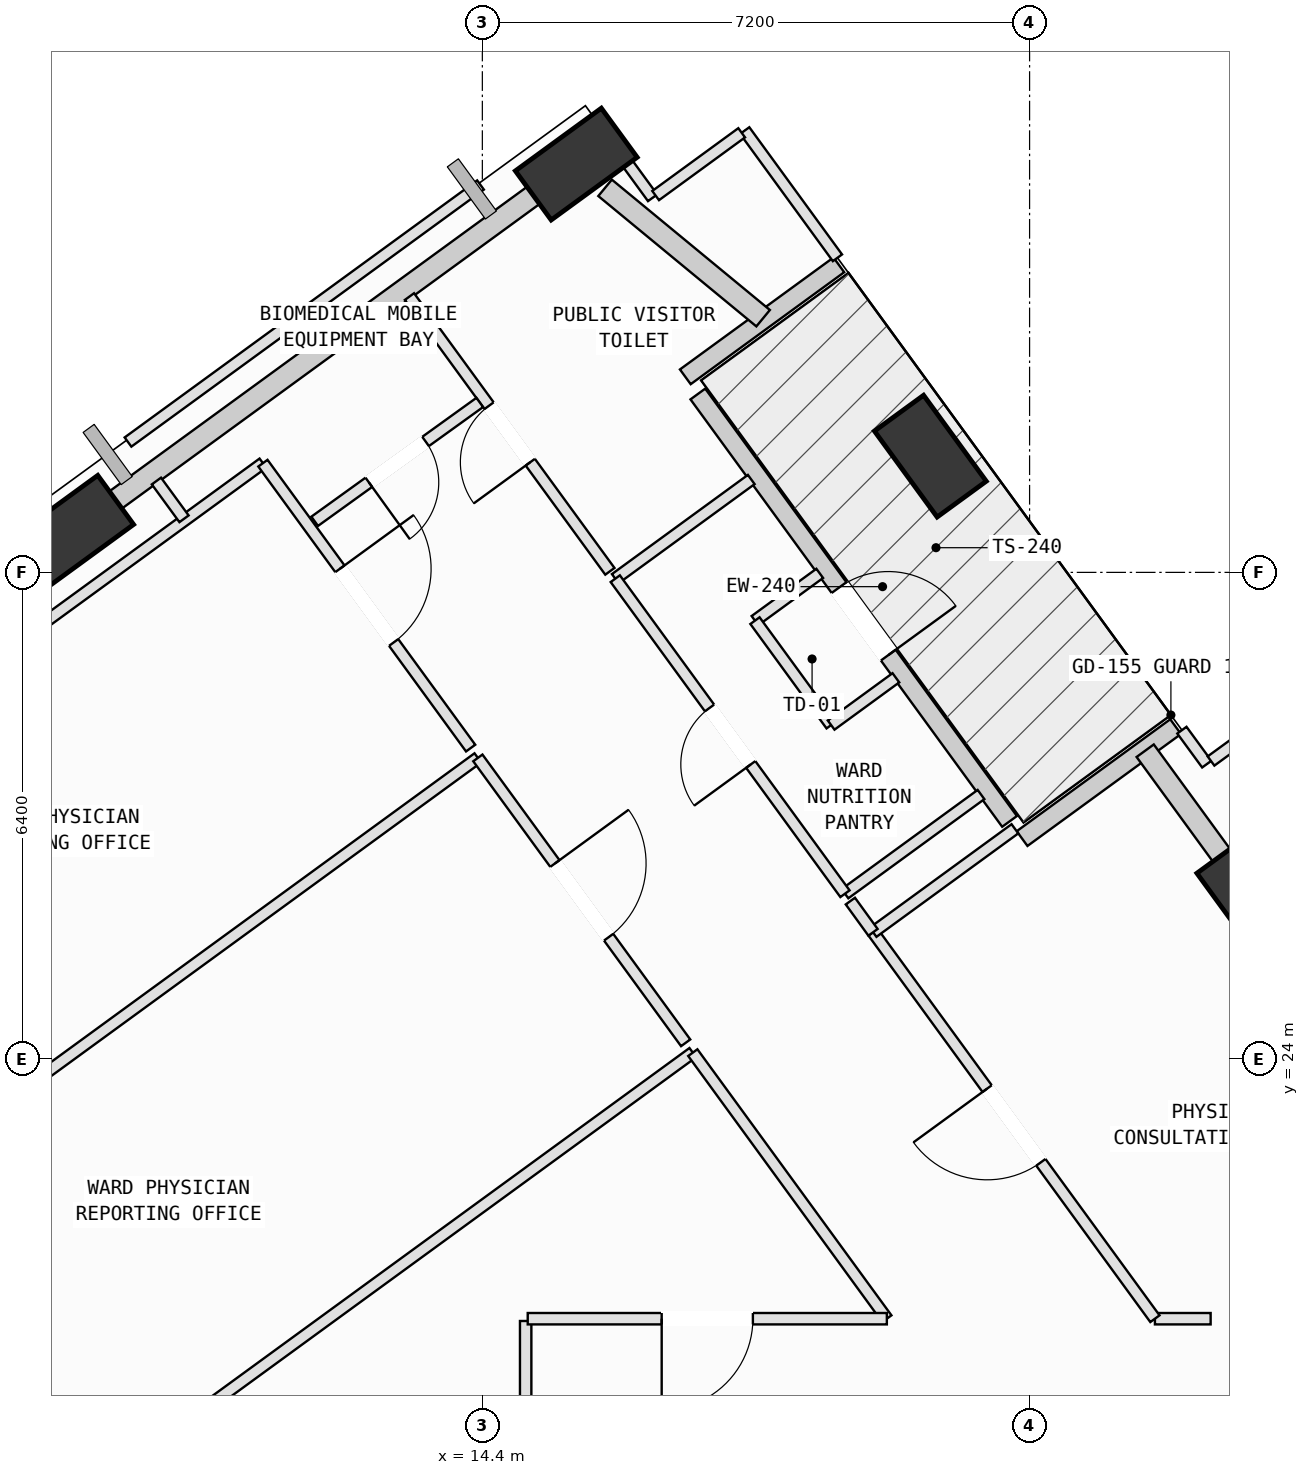
"""IFC4 building model, lengths in metres.
Left out: names, types, materials, properties, quantities, classifications, styles, units other than length and angle.
Written with IfcOpenShell. Run it as: python <this file> out.ifc"""

import sys

from ifc_helpers import new_model, si_unit, direction, frame, frame_2d, origin, origin_2d, place, context, subcontext, project, spatial, rectangle, extrude, element, fill, save


model = new_model("IFC4")
c1 = context("Model", 3, precision=1e-05, world=origin(), true_north=direction((0.0, 1.0)))
c2 = subcontext(c1, "Body", "Model", "MODEL_VIEW")
j1 = project(units=[si_unit("LENGTHUNIT", "METRE"), si_unit("PLANEANGLEUNIT", "RADIAN")], contexts=[c1])
p1 = place(None, origin())
s1 = spatial("IfcSite", under=j1, at=p1, CompositionType="ELEMENT")
p2 = place(p1, origin())
s2 = spatial("IfcBuilding", under=s1, at=p2, CompositionType="ELEMENT")
p3 = place(p2, frame((0.0, 0.0, 177.8)))
s3 = spatial("IfcBuildingStorey", under=s2, at=p3, CompositionType="ELEMENT", Elevation=177.8)
p4 = place(p3, frame((24.537, 26.112, 0.002), z_axis=(-0.005127954064, -0.037604996467, 0.999279524622), x_axis=(-0.474702077533, 0.879612161779, 0.030665655638)))
e1 = element("IfcColumn", 1, at=p4, inside=s3, PredefinedType="COLUMN", context=c2, shape_type="SweptSolid", body=[
    extrude(rectangle(XDim=1.4, YDim=0.8, at=origin_2d()), origin(), (0.0, 0.0, 1.0), 3.999),
])
p5 = place(p3, frame((20.294, 31.929, 0.002), z_axis=(-0.029022589013, -0.055301445872, 0.998047814191), x_axis=(-0.146974765594, 0.987852188566, 0.050462578447)))
e2 = element("IfcColumn", 2, at=p5, inside=s3, PredefinedType="COLUMN", context=c2, shape_type="SweptSolid", body=[
    extrude(rectangle(XDim=1.4, YDim=0.8, at=origin_2d()), origin(), (0.0, 0.0, 1.0), 4.004),
])
p6 = place(p3, frame((15.636, 35.772, 0.002), z_axis=(-0.044671178967, -0.074553398139, 0.99621597889), x_axis=(0.994784763155, 0.088209875762, 0.051208327568)))
e3 = element("IfcColumn", 3, at=p6, inside=s3, PredefinedType="COLUMN", context=c2, shape_type="SweptSolid", body=[
    extrude(rectangle(XDim=1.4, YDim=0.8, at=origin_2d()), origin(), (0.0, 0.0, 1.0), 4.011),
])
p7 = place(p3, frame((9.01, 30.941, 0.002), z_axis=(-0.024485078273, -0.101524977159, 0.994531628434), x_axis=(0.922851813441, 0.380208094737, 0.061533203441)))
e4 = element("IfcColumn", 4, at=p7, inside=s3, PredefinedType="COLUMN", context=c2, shape_type="SweptSolid", body=[
    extrude(rectangle(XDim=1.4, YDim=0.8, at=origin_2d()), origin(), (0.0, 0.0, 1.0), 4.018),
])
p8 = place(p3, frame((17.236, 32.747, 0.0), z_axis=(0.0, 0.0, 1.0), x_axis=(0.589164046523, -0.808013444371, 0.0)))
e5 = element("IfcWall", 5, at=p8, inside=s3, PredefinedType="SOLIDWALL", context=c2, shape_type="SweptSolid", body=[
    extrude(rectangle(XDim=6.96, YDim=0.24, at=frame_2d((3.48, 0.0))), origin(), (0.0, 0.0, 1.0), 3.265),
])
p9 = place(p8, frame((3.152, 0.0, 0.0)))
e6 = element("IfcOpeningElement", 6, at=p9, cuts=e5, PredefinedType="OPENING", context=c2, shape_type="SweptSolid", body=[
    extrude(rectangle(XDim=1.1, YDim=2.15, at=frame_2d((0.55, 1.075))), frame((0.0, 0.13, 0.0), z_axis=(0.0, -1.0, 0.0), x_axis=(1.0, 0.0, 0.0)), (0.0, 0.0, 1.0), 0.26),
])
p10 = place(p3, frame((21.501, 26.897, 0.0), z_axis=(0.0, 0.0, 1.0), x_axis=(0.808013341442, 0.589164187686, 0.0)))
e7 = element("IfcWall", 7, at=p10, inside=s3, PredefinedType="SOLIDWALL", context=c2, shape_type="SweptSolid", body=[
    extrude(rectangle(XDim=2.5, YDim=0.24, at=frame_2d((1.25, 0.0))), origin(), (0.0, 0.0, 1.0), 3.265),
])
p11 = place(p3, frame((19.091, 34.446, 0.0), z_axis=(0.0, 0.0, 1.0), x_axis=(-0.807966851779, -0.589227940976, 0.0)))
e8 = element("IfcWall", 8, at=p11, inside=s3, PredefinedType="SOLIDWALL", context=c2, shape_type="SweptSolid", body=[
    extrude(rectangle(XDim=2.5, YDim=0.24, at=frame_2d((1.25, 0.0))), origin(), (0.0, 0.0, 1.0), 3.265),
])
p12 = place(p3, frame((24.278, 26.466, 0.0), z_axis=(0.0, 0.0, 1.0), x_axis=(-0.589146798516, 0.808026020496, 0.0)))
e9 = element("IfcWall", 9, at=p12, inside=s3, PredefinedType="SOLIDWALL", context=c2, shape_type="SweptSolid", body=[
    extrude(rectangle(XDim=1.964, YDim=0.28, at=frame_2d((0.982, 0.0))), origin(), (0.0, 0.0, 1.0), 3.245),
])
p13 = place(p3, frame((16.015, 35.46, 0.0), z_axis=(0.0, 0.0, 1.0), x_axis=(0.771396619777, -0.63635466133, 0.0)))
e10 = element("IfcWall", 10, at=p13, inside=s3, PredefinedType="SOLIDWALL", context=c2, shape_type="SweptSolid", body=[
    extrude(rectangle(XDim=2.696, YDim=0.28, at=frame_2d((1.348, 0.0))), origin(), (0.0, 0.0, 1.0), 3.245),
])
p14 = place(p3, frame((9.267, 31.128, 0.0), z_axis=(0.0, 0.0, 1.0), x_axis=(0.807974712065, 0.589217162567, 0.0)))
e11 = element("IfcWall", 11, at=p14, inside=s3, PredefinedType="SOLIDWALL", context=c2, shape_type="SweptSolid", body=[
    extrude(rectangle(XDim=7.231, YDim=0.28, at=frame_2d((3.615, 0.0))), origin(), (0.0, 0.0, 1.0), 3.265),
])
p15 = place(p3, frame((14.97, 20.55, 0.0), z_axis=(0.0, 0.0, 1.0), x_axis=(0.0, -1.0, 0.0)))
e12 = element("IfcWall", 12, at=p15, inside=s3, PredefinedType="PARTITIONING", context=c2, shape_type="SweptSolid", body=[
    extrude(rectangle(XDim=2.32, YDim=0.15, at=frame_2d((1.16, 0.0))), origin(), (0.0, 0.0, 1.0), 3.78),
])
p16 = place(p3, frame((6.152, 16.047, 0.0), z_axis=(0.0, 0.0, 1.0), x_axis=(0.807978938545, 0.589211366886, 0.0)))
e13 = element("IfcWall", 13, at=p16, inside=s3, PredefinedType="PARTITIONING", context=c2, shape_type="SweptSolid", body=[
    extrude(rectangle(XDim=13.635, YDim=0.15, at=frame_2d((6.817, 0.0))), origin(), (0.0, 0.0, 1.0), 3.78),
])
p17 = place(p3, frame((17.169, 24.081, 0.0), z_axis=(0.0, 0.0, 1.0), x_axis=(0.589199746841, -0.807987412231, 0.0)))
e14 = element("IfcWall", 14, at=p17, inside=s3, PredefinedType="PARTITIONING", context=c2, shape_type="SweptSolid", body=[
    extrude(rectangle(XDim=4.333, YDim=0.15, at=frame_2d((2.167, 0.0))), origin(), (0.0, 0.0, 1.0), 3.78),
])
p18 = place(p3, frame((19.722, 20.58, 0.0), z_axis=(0.0, 0.0, 1.0), x_axis=(-1.0, 0.0, 0.0)))
e15 = element("IfcWall", 15, at=p18, inside=s3, PredefinedType="PARTITIONING", context=c2, shape_type="SweptSolid", body=[
    extrude(rectangle(XDim=4.725, YDim=0.15, at=frame_2d((2.362, 0.0))), origin(), (0.0, 0.0, 1.0), 3.78),
])
p19 = place(p18, frame((1.762, 0.0, 0.0)))
e16 = element("IfcOpeningElement", 16, at=p19, cuts=e15, PredefinedType="OPENING", context=c2, shape_type="SweptSolid", body=[
    extrude(rectangle(XDim=1.2, YDim=2.15, at=frame_2d((0.6, 1.075))), frame((0.0, 0.085, 0.0), z_axis=(0.0, -1.0, 0.0), x_axis=(1.0, 0.0, 0.0)), (0.0, 0.0, 1.0), 0.17),
])
p20 = place(p3, frame((3.324, 19.925, 0.0), z_axis=(0.0, 0.0, 1.0), x_axis=(0.807985154612, 0.589202842769, 0.0)))
e17 = element("IfcWall", 17, at=p20, inside=s3, PredefinedType="PARTITIONING", context=c2, shape_type="SweptSolid", body=[
    extrude(rectangle(XDim=13.635, YDim=0.15, at=frame_2d((6.818, 0.0))), origin(), (0.0, 0.0, 1.0), 3.78),
])
p21 = place(p3, frame((14.341, 27.959, 0.0), z_axis=(0.0, 0.0, 1.0), x_axis=(0.589203646607, -0.807984568432, 0.0)))
e18 = element("IfcWall", 18, at=p21, inside=s3, PredefinedType="PARTITIONING", context=c2, shape_type="SweptSolid", body=[
    extrude(rectangle(XDim=4.64, YDim=0.15, at=frame_2d((2.32, 0.0))), origin(), (0.0, 0.0, 1.0), 3.78),
])
p22 = place(p21, frame((1.72, 0.0, 0.0)))
e19 = element("IfcOpeningElement", 19, at=p22, cuts=e18, PredefinedType="OPENING", context=c2, shape_type="SweptSolid", body=[
    extrude(rectangle(XDim=1.2, YDim=2.15, at=frame_2d((0.6, 1.075))), frame((0.0, 0.085, 0.0), z_axis=(0.0, -1.0, 0.0), x_axis=(1.0, 0.0, 0.0)), (0.0, 0.0, 1.0), 0.17),
])
p23 = place(p3, frame((2.513, 25.275, 0.0), z_axis=(0.0, 0.0, 1.0), x_axis=(0.808028399197, 0.589143536068, 0.0)))
e20 = element("IfcWall", 20, at=p23, inside=s3, PredefinedType="PARTITIONING", context=c2, shape_type="SweptSolid", body=[
    extrude(rectangle(XDim=11.138, YDim=0.15, at=frame_2d((5.569, 0.0))), origin(), (0.0, 0.0, 1.0), 3.265),
])
p24 = place(p3, frame((11.513, 31.837, 0.0), z_axis=(0.0, 0.0, 1.0), x_axis=(0.589100581197, -0.808059716378, 0.0)))
e21 = element("IfcWall", 21, at=p24, inside=s3, PredefinedType="PARTITIONING", context=c2, shape_type="SweptSolid", body=[
    extrude(rectangle(XDim=4.64, YDim=0.15, at=frame_2d((2.32, 0.0))), origin(), (0.0, 0.0, 1.0), 3.78),
])
p25 = place(p24, frame((1.72, 0.0, 0.0)))
e22 = element("IfcOpeningElement", 22, at=p25, cuts=e21, PredefinedType="OPENING", context=c2, shape_type="SweptSolid", body=[
    extrude(rectangle(XDim=1.2, YDim=2.15, at=frame_2d((0.6, 1.075))), frame((0.0, 0.085, 0.0), z_axis=(0.0, -1.0, 0.0), x_axis=(1.0, 0.0, 0.0)), (0.0, 0.0, 1.0), 0.17),
])
p26 = place(p3, frame((23.982, 20.58, 0.0), z_axis=(0.0, 0.0, 1.0), x_axis=(-1.0, 0.0, 0.0)))
e23 = element("IfcWall", 23, at=p26, inside=s3, PredefinedType="PARTITIONING", context=c2, shape_type="SweptSolid", body=[
    extrude(rectangle(XDim=0.733, YDim=0.15, at=frame_2d((0.366, 0.0))), origin(), (0.0, 0.0, 1.0), 3.78),
])
p27 = place(p3, frame((23.249, 20.58, 0.0), z_axis=(0.0, 0.0, 1.0), x_axis=(-0.589195373933, 0.807990601019, 0.0)))
e24 = element("IfcWall", 24, at=p27, inside=s3, PredefinedType="PARTITIONING", context=c2, shape_type="SweptSolid", body=[
    extrude(rectangle(XDim=6.293, YDim=0.15, at=frame_2d((3.147, 0.0))), origin(), (0.0, 0.0, 1.0), 3.78),
])
p28 = place(p27, frame((2.547, 0.0, 0.0)))
e25 = element("IfcOpeningElement", 25, at=p28, cuts=e24, PredefinedType="OPENING", context=c2, shape_type="SweptSolid", body=[
    extrude(rectangle(XDim=1.2, YDim=2.15, at=frame_2d((0.6, 1.075))), frame((0.0, 0.085, 0.0), z_axis=(0.0, -1.0, 0.0), x_axis=(1.0, 0.0, 0.0)), (0.0, 0.0, 1.0), 0.17),
])
p29 = place(p3, frame((19.541, 25.665, 0.0), z_axis=(0.0, 0.0, 1.0), x_axis=(0.807958250953, 0.589239734503, 0.0)))
e26 = element("IfcWall", 26, at=p29, inside=s3, PredefinedType="PARTITIONING", context=c2, shape_type="SweptSolid", body=[
    extrude(rectangle(XDim=2.31, YDim=0.15, at=frame_2d((1.155, 0.0))), origin(), (0.0, 0.0, 1.0), 3.78),
])
p30 = place(p3, frame((23.604, 28.324, 0.0), z_axis=(0.0, 0.0, 1.0), x_axis=(0.590292880672, -0.807189144518, 0.0)))
e27 = element("IfcWall", 27, at=p30, inside=s3, PredefinedType="PARTITIONING", context=c2, shape_type="SweptSolid", body=[
    extrude(rectangle(XDim=0.554, YDim=0.15, at=frame_2d((0.277, 0.0))), origin(), (0.0, 0.0, 1.0), 3.78),
])
p31 = place(p3, frame((16.149, 30.317, 0.0), z_axis=(0.0, 0.0, 1.0), x_axis=(0.807867554791, 0.589364075861, 0.0)))
e28 = element("IfcWall", 28, at=p31, inside=s3, PredefinedType="PARTITIONING", context=c2, shape_type="SweptSolid", body=[
    extrude(rectangle(XDim=2.215, YDim=0.15, at=frame_2d((1.107, 0.0))), origin(), (0.0, 0.0, 1.0), 3.78),
])
p32 = place(p3, frame((18.839, 30.387, 0.0), z_axis=(0.0, 0.0, 1.0), x_axis=(-0.807653927486, -0.589656792903, 0.0)))
e29 = element("IfcWall", 29, at=p32, inside=s3, PredefinedType="PARTITIONING", context=c2, shape_type="SweptSolid", body=[
    extrude(rectangle(XDim=1.055, YDim=0.15, at=frame_2d((0.527, 0.0))), origin(), (0.0, 0.0, 1.0), 3.78),
])
p33 = place(p3, frame((17.987, 29.765, 0.0), z_axis=(0.0, 0.0, 1.0), x_axis=(0.589263942503, -0.807940595629, 0.0)))
e30 = element("IfcWall", 30, at=p33, inside=s3, PredefinedType="PARTITIONING", context=c2, shape_type="SweptSolid", body=[
    extrude(rectangle(XDim=1.7, YDim=0.15, at=frame_2d((0.85, 0.0))), origin(), (0.0, 0.0, 1.0), 3.78),
])
p34 = place(p3, frame((18.989, 28.391, 0.0), z_axis=(0.0, 0.0, 1.0), x_axis=(0.807764139301, 0.589505805959, 0.0)))
e31 = element("IfcWall", 31, at=p34, inside=s3, PredefinedType="PARTITIONING", context=c2, shape_type="SweptSolid", body=[
    extrude(rectangle(XDim=1.055, YDim=0.15, at=frame_2d((0.527, 0.0))), origin(), (0.0, 0.0, 1.0), 3.78),
])
p35 = place(p3, frame((20.961, 27.477, 0.0), z_axis=(0.0, 0.0, 1.0), x_axis=(-0.808073108898, -0.589082210456, 0.0)))
e32 = element("IfcWall", 32, at=p35, inside=s3, PredefinedType="PARTITIONING", context=c2, shape_type="SweptSolid", body=[
    extrude(rectangle(XDim=2.215, YDim=0.15, at=frame_2d((1.107, 0.0))), origin(), (0.0, 0.0, 1.0), 3.78),
])
p36 = place(p3, frame((19.171, 26.172, 0.0), z_axis=(0.0, 0.0, 1.0), x_axis=(-0.589139140752, 0.808031603858, 0.0)))
e33 = element("IfcWall", 33, at=p36, inside=s3, PredefinedType="PARTITIONING", context=c2, shape_type="SweptSolid", body=[
    extrude(rectangle(XDim=5.129, YDim=0.15, at=frame_2d((2.565, 0.0))), origin(), (0.0, 0.0, 1.0), 3.78),
])
p37 = place(p36, frame((2.105, 0.0, 0.0)))
e34 = element("IfcOpeningElement", 34, at=p37, cuts=e33, PredefinedType="OPENING", context=c2, shape_type="SweptSolid", body=[
    extrude(rectangle(XDim=0.92, YDim=2.1, at=frame_2d((0.46, 1.05))), frame((0.0, 0.085, 0.0), z_axis=(0.0, -1.0, 0.0), x_axis=(1.0, 0.0, 0.0)), (0.0, 0.0, 1.0), 0.17),
])
p38 = place(p3, frame((17.852, 36.213, 0.0), z_axis=(0.0, 0.0, 1.0), x_axis=(0.589005407572, -0.808129092318, 0.0)))
e35 = element("IfcWall", 35, at=p38, inside=s3, PredefinedType="PARTITIONING", context=c2, shape_type="SweptSolid", body=[
    extrude(rectangle(XDim=2.071, YDim=0.15, at=frame_2d((1.036, 0.0))), origin(), (0.0, 0.0, 1.0), 3.78),
])
p39 = place(p3, frame((16.078, 30.414, 0.0), z_axis=(0.0, 0.0, 1.0), x_axis=(-0.589322799206, 0.807897665757, 0.0)))
e36 = element("IfcWall", 36, at=p39, inside=s3, PredefinedType="PARTITIONING", context=c2, shape_type="SweptSolid", body=[
    extrude(rectangle(XDim=4.475, YDim=0.15, at=frame_2d((2.237, 0.0))), origin(), (0.0, 0.0, 1.0), 3.78),
])
p40 = place(p39, frame((1.777, 0.0, 0.0)))
e37 = element("IfcOpeningElement", 37, at=p40, cuts=e36, PredefinedType="OPENING", context=c2, shape_type="SweptSolid", body=[
    extrude(rectangle(XDim=0.92, YDim=2.1, at=frame_2d((0.46, 1.05))), frame((0.0, 0.085, 0.0), z_axis=(0.0, -1.0, 0.0), x_axis=(1.0, 0.0, 0.0)), (0.0, 0.0, 1.0), 0.17),
])
p41 = place(p3, frame((14.997, 35.542, 0.0), z_axis=(0.0, 0.0, 1.0), x_axis=(0.807997455197, 0.589185974371, 0.0)))
e38 = element("IfcWall", 38, at=p41, inside=s3, PredefinedType="PARTITIONING", context=c2, shape_type="SweptSolid", body=[
    extrude(rectangle(XDim=1.202, YDim=0.15, at=frame_2d((0.601, 0.0))), origin(), (0.0, 0.0, 1.0), 3.265),
])
p42 = place(p3, frame((15.997, 36.21, 0.0), z_axis=(0.0, 0.0, 1.0), x_axis=(0.589488811875, -0.8077765413, 0.0)))
e39 = element("IfcWall", 39, at=p42, inside=s3, PredefinedType="PARTITIONING", context=c2, shape_type="SweptSolid", body=[
    extrude(rectangle(XDim=1.091, YDim=0.15, at=frame_2d((0.545, 0.0))), origin(), (0.0, 0.0, 1.0), 3.78),
])
p43 = place(p3, frame((16.68, 35.358, 0.0), z_axis=(0.0, 0.0, 1.0), x_axis=(0.807770770607, 0.589496719374, 0.0)))
e40 = element("IfcWall", 40, at=p43, inside=s3, PredefinedType="PARTITIONING", context=c2, shape_type="SweptSolid", body=[
    extrude(rectangle(XDim=1.401, YDim=0.15, at=frame_2d((0.701, 0.0))), origin(), (0.0, 0.0, 1.0), 3.78),
])
p44 = place(p3, frame((14.366, 32.636, 0.0), z_axis=(0.0, 0.0, 1.0), x_axis=(-0.811496275177, -0.584357592039, 0.0)))
e41 = element("IfcWall", 41, at=p44, inside=s3, PredefinedType="PARTITIONING", context=c2, shape_type="SweptSolid", body=[
    extrude(rectangle(XDim=2.676, YDim=0.15, at=frame_2d((1.338, 0.0))), origin(), (0.0, 0.0, 1.0), 3.78),
])
p45 = place(p44, frame((0.878, 0.0, 0.0)))
e42 = element("IfcOpeningElement", 42, at=p45, cuts=e41, PredefinedType="OPENING", context=c2, shape_type="SweptSolid", body=[
    extrude(rectangle(XDim=0.92, YDim=2.1, at=frame_2d((0.46, 1.05))), frame((0.0, 0.085, 0.0), z_axis=(0.0, -1.0, 0.0), x_axis=(1.0, 0.0, 0.0)), (0.0, 0.0, 1.0), 0.17),
])
p46 = place(p3, frame((10.475, 31.105, 0.0), z_axis=(0.0, 0.0, 1.0), x_axis=(-0.589797786762, 0.80755097098, 0.0)))
e43 = element("IfcWall", 43, at=p46, inside=s3, PredefinedType="PARTITIONING", context=c2, shape_type="SweptSolid", body=[
    extrude(rectangle(XDim=0.615, YDim=0.15, at=frame_2d((0.308, 0.0))), origin(), (0.0, 0.0, 1.0), 3.78),
])
p47 = place(p3, frame((9.738, 32.115, 0.0), z_axis=(0.0, 0.0, 1.0), x_axis=(0.807986860135, 0.589200503945, 0.0)))
e44 = element("IfcWall", 44, at=p47, inside=s3, PredefinedType="PARTITIONING", context=c2, shape_type="SweptSolid", body=[
    extrude(rectangle(XDim=5.74, YDim=0.15, at=frame_2d((2.87, 0.0))), origin(), (0.0, 0.0, 1.0), 3.78),
])
p48 = place(p3, frame((19.242, 26.075, 0.0), z_axis=(0.0, 0.0, 1.0), x_axis=(0.587227615189, -0.809421847963, 0.0)))
e45 = element("IfcWall", 45, at=p48, inside=s3, PredefinedType="PARTITIONING", context=c2, shape_type="SweptSolid", body=[
    extrude(rectangle(XDim=0.508, YDim=0.15, at=frame_2d((0.254, 0.0))), origin(), (0.0, 0.0, 1.0), 3.78),
])
p49 = place(p3, frame((23.987, 27.918, 0.0), z_axis=(0.0, 0.0, 1.0), x_axis=(0.80794727728, 0.589254781174, 0.0)))
e46 = element("IfcWall", 46, at=p49, inside=s3, PredefinedType="PARTITIONING", context=c2, shape_type="SweptSolid", body=[
    extrude(rectangle(XDim=2.13, YDim=0.15, at=frame_2d((1.065, 0.0))), origin(), (0.0, 0.0, 1.0), 3.78),
])
p50 = place(p9, origin())
e47 = element("IfcDoor", 47, at=p50, inside=s3, OperationType="SINGLE_SWING_RIGHT", PredefinedType="DOOR", context=c2, shape_type="SweptSolid", body=[
    extrude(rectangle(XDim=1.1, YDim=2.15, at=frame_2d((0.55, 1.075))), frame((0.0, 0.025, 0.0), z_axis=(0.0, -1.0, 0.0), x_axis=(1.0, 0.0, 0.0)), (0.0, 0.0, 1.0), 0.05),
])
fill(e6, e47)
p51 = place(p19, origin())
e48 = element("IfcDoor", 48, at=p51, inside=s3, OperationType="SINGLE_SWING_RIGHT", PredefinedType="DOOR", context=c2, shape_type="SweptSolid", body=[
    extrude(rectangle(XDim=1.2, YDim=2.15, at=frame_2d((0.6, 1.075))), frame((0.0, 0.025, 0.0), z_axis=(0.0, -1.0, 0.0), x_axis=(1.0, 0.0, 0.0)), (0.0, 0.0, 1.0), 0.05),
])
fill(e16, e48)
p52 = place(p22, origin())
e49 = element("IfcDoor", 49, at=p52, inside=s3, OperationType="SINGLE_SWING_LEFT", PredefinedType="DOOR", context=c2, shape_type="SweptSolid", body=[
    extrude(rectangle(XDim=1.2, YDim=2.15, at=frame_2d((0.6, 1.075))), frame((0.0, 0.025, 0.0), z_axis=(0.0, -1.0, 0.0), x_axis=(1.0, 0.0, 0.0)), (0.0, 0.0, 1.0), 0.05),
])
fill(e19, e49)
p53 = place(p25, origin())
e50 = element("IfcDoor", 50, at=p53, inside=s3, OperationType="SINGLE_SWING_LEFT", PredefinedType="DOOR", context=c2, shape_type="SweptSolid", body=[
    extrude(rectangle(XDim=1.2, YDim=2.15, at=frame_2d((0.6, 1.075))), frame((0.0, 0.025, 0.0), z_axis=(0.0, -1.0, 0.0), x_axis=(1.0, 0.0, 0.0)), (0.0, 0.0, 1.0), 0.05),
])
fill(e22, e50)
p54 = place(p28, origin())
e51 = element("IfcDoor", 51, at=p54, inside=s3, OperationType="SINGLE_SWING_RIGHT", PredefinedType="DOOR", context=c2, shape_type="SweptSolid", body=[
    extrude(rectangle(XDim=1.2, YDim=2.15, at=frame_2d((0.6, 1.075))), frame((0.0, 0.025, 0.0), z_axis=(0.0, -1.0, 0.0), x_axis=(1.0, 0.0, 0.0)), (0.0, 0.0, 1.0), 0.05),
])
fill(e25, e51)
p55 = place(p37, origin())
e52 = element("IfcDoor", 52, at=p55, inside=s3, OperationType="SINGLE_SWING_LEFT", PredefinedType="DOOR", context=c2, shape_type="SweptSolid", body=[
    extrude(rectangle(XDim=0.92, YDim=2.1, at=frame_2d((0.46, 1.05))), frame((0.0, 0.025, 0.0), z_axis=(0.0, -1.0, 0.0), x_axis=(1.0, 0.0, 0.0)), (0.0, 0.0, 1.0), 0.05),
])
fill(e34, e52)
p56 = place(p40, origin())
e53 = element("IfcDoor", 53, at=p56, inside=s3, OperationType="SINGLE_SWING_LEFT", PredefinedType="DOOR", context=c2, shape_type="SweptSolid", body=[
    extrude(rectangle(XDim=0.92, YDim=2.1, at=frame_2d((0.46, 1.05))), frame((0.0, 0.025, 0.0), z_axis=(0.0, -1.0, 0.0), x_axis=(1.0, 0.0, 0.0)), (0.0, 0.0, 1.0), 0.05),
])
fill(e37, e53)
p57 = place(p45, origin())
e54 = element("IfcDoor", 54, at=p57, inside=s3, OperationType="SINGLE_SWING_RIGHT", PredefinedType="DOOR", context=c2, shape_type="SweptSolid", body=[
    extrude(rectangle(XDim=0.92, YDim=2.1, at=frame_2d((0.46, 1.05))), frame((0.0, 0.025, 0.0), z_axis=(0.0, -1.0, 0.0), x_axis=(1.0, 0.0, 0.0)), (0.0, 0.0, 1.0), 0.05),
])
fill(e42, e54)
save(model, sys.argv[1])
